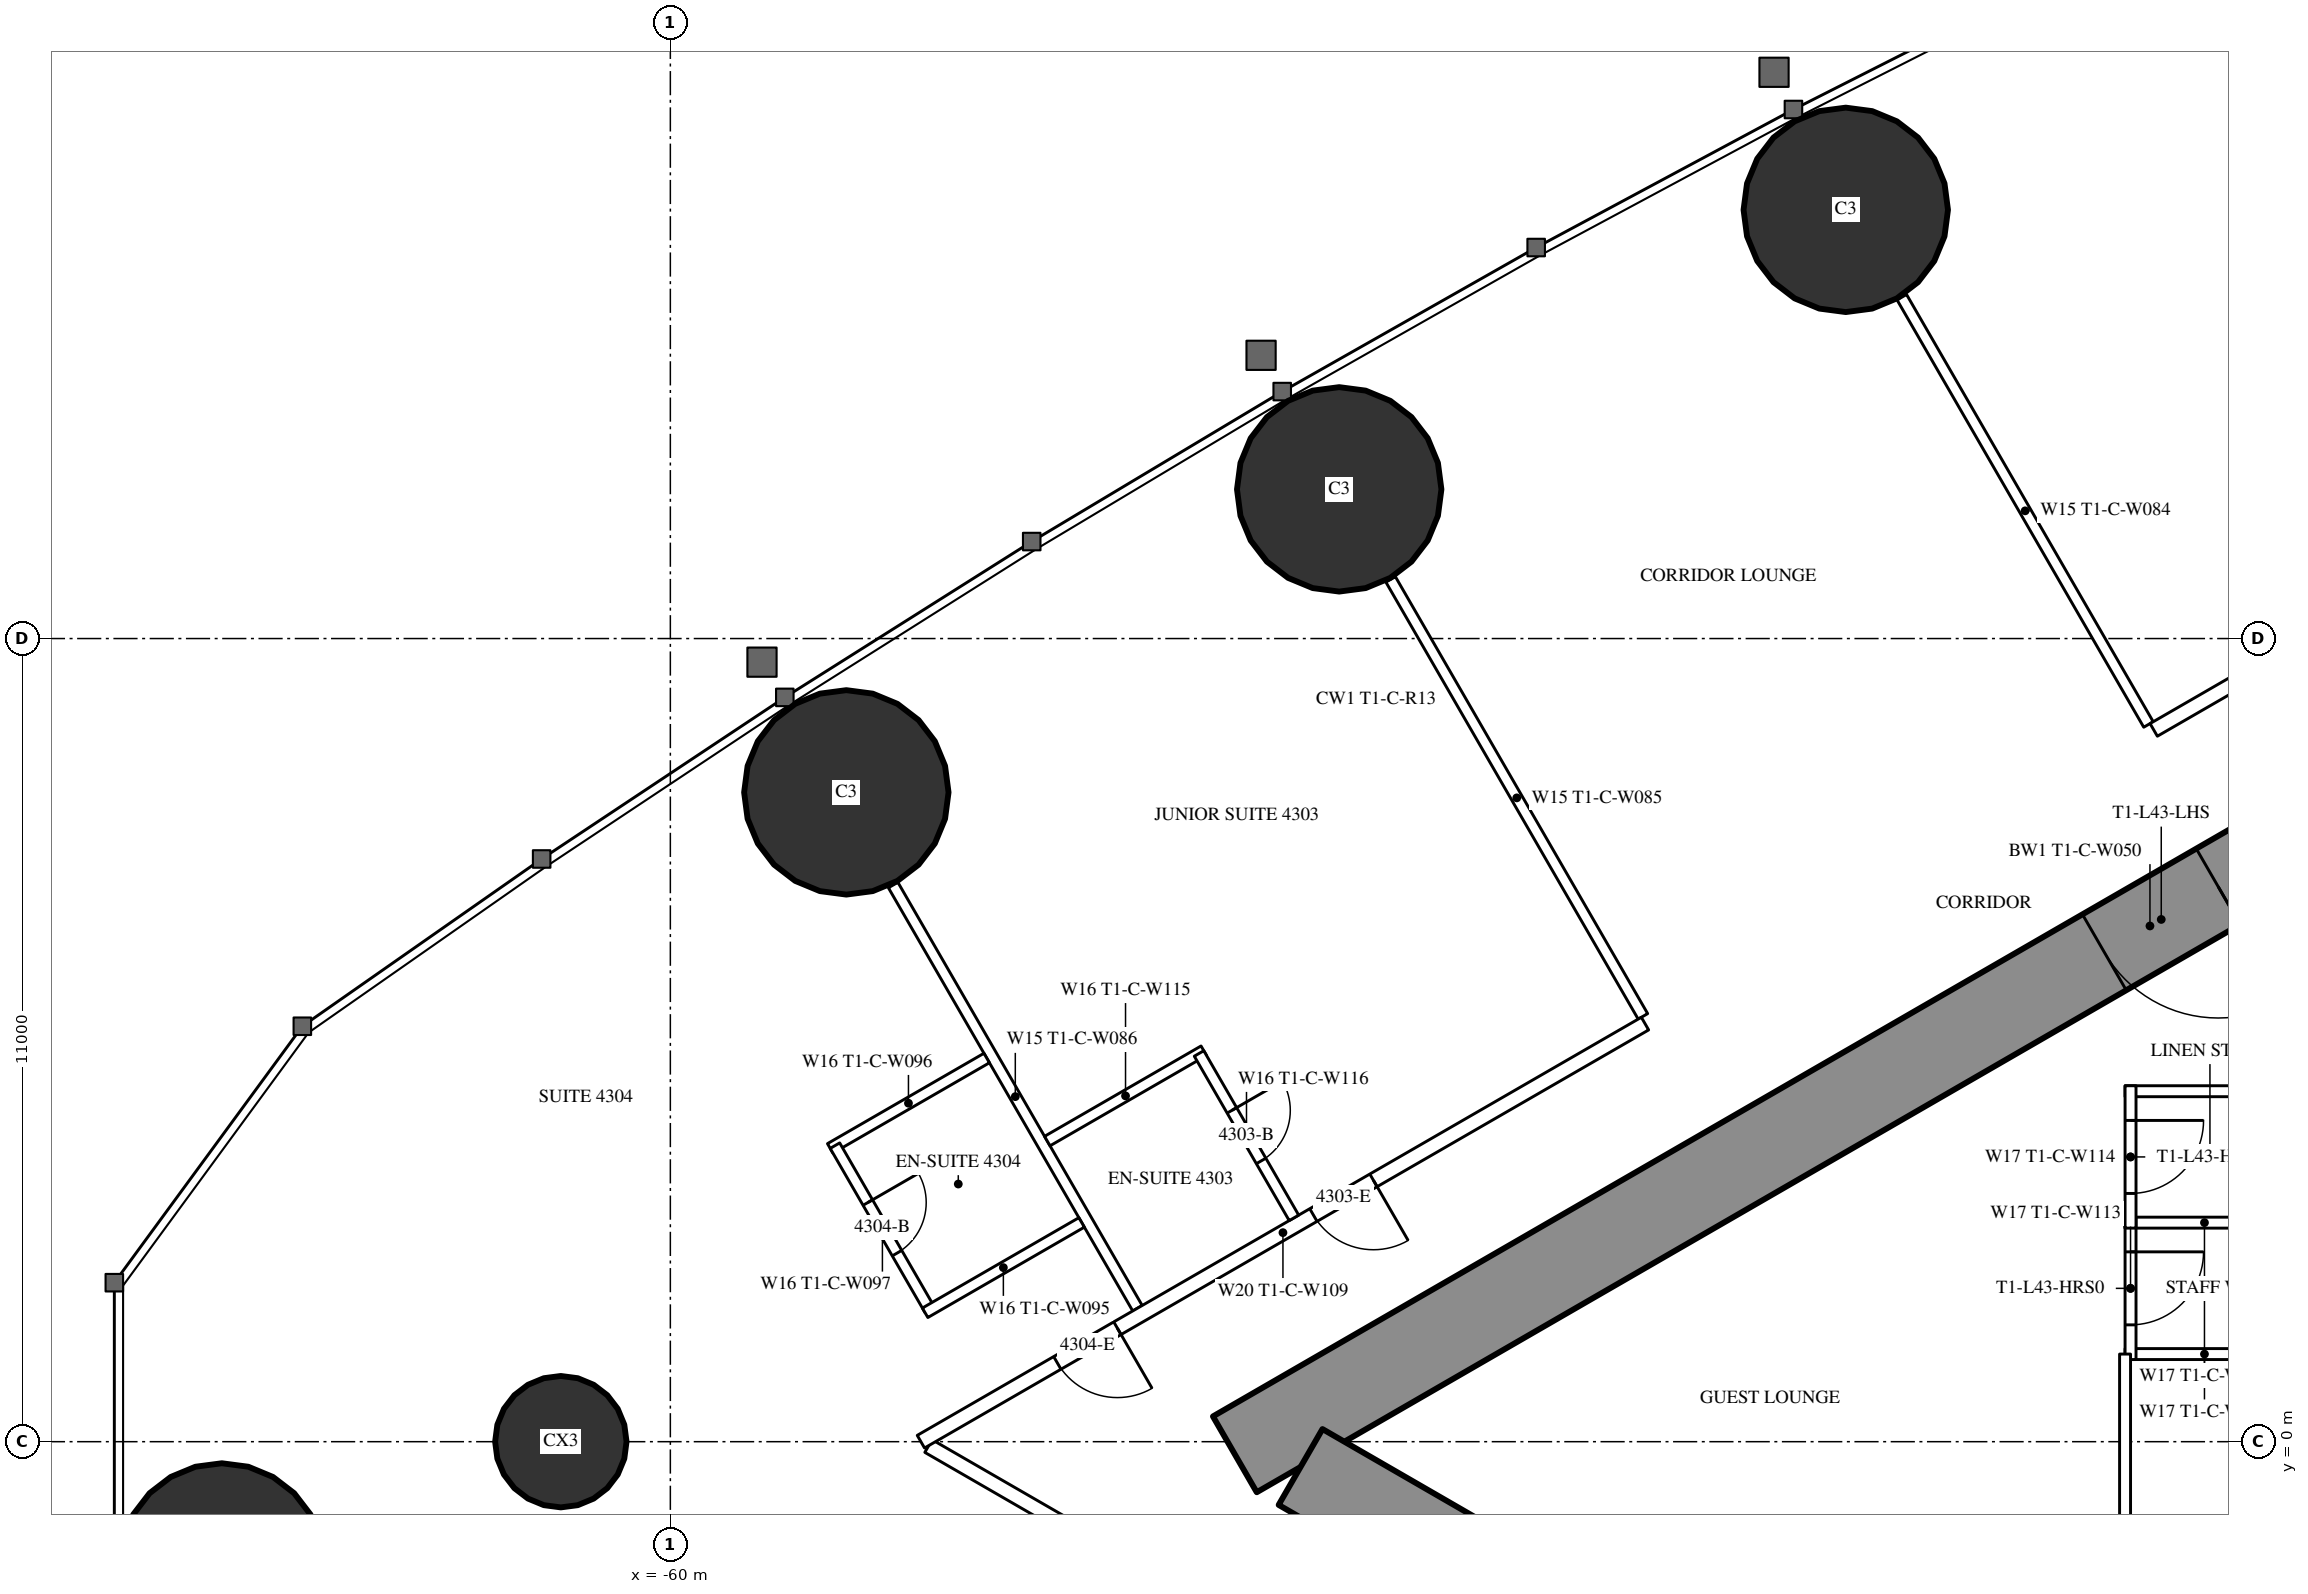
"""IFC4 building model, lengths in metres.
Left out: names, types, materials, properties, quantities, classifications, styles, units other than length and angle.
Written with IfcOpenShell. Run it as: python <this file> out.ifc"""

import sys

from ifc_helpers import new_model, si_unit, direction, frame, frame_2d, origin, origin_2d, place, context, subcontext, project, spatial, rectangle, circle, extrude, element, fill, save


model = new_model("IFC4")
c1 = context("Model", 3, precision=1e-05, world=origin(), true_north=direction((0.0, 1.0)))
c2 = subcontext(c1, "Body", "Model", "MODEL_VIEW")
j1 = project(units=[si_unit("LENGTHUNIT", "METRE"), si_unit("PLANEANGLEUNIT", "RADIAN")], contexts=[c1])
p1 = place(None, origin())
s1 = spatial("IfcSite", under=j1, at=p1, CompositionType="ELEMENT")
p2 = place(p1, origin())
s2 = spatial("IfcBuilding", under=s1, at=p2, CompositionType="ELEMENT")
p3 = place(p2, frame((0.0, 0.0, 163.3)))
s3 = spatial("IfcBuildingStorey", under=s2, at=p3, CompositionType="ELEMENT", Elevation=163.3)
for number, where, z_axis, x_axis in (
    (1, (-66.143, -1.695, 0.0), (0.0, 0.0, 1.0), (1.0, 0.0, 0.0)),
    (2, (-43.9, 16.871, 0.0), (0.0, 0.0, 1.0), (1.0, 0.0, 0.0)),
    (3, (-50.839, 13.043, 0.0), (0.0, 0.0, 1.0), (1.0, 0.0, 0.0)),
    (4, (-57.59, 8.893, 0.0), (0.0, 0.0, 1.0), (1.0, 0.0, 0.0)),
):
    element("IfcColumn", number, at=place(p3, frame(where, z_axis=z_axis, x_axis=x_axis)), inside=s3, PredefinedType="COLUMN", context=c2, shape_type="SweptSolid", body=[
        extrude(circle(Radius=1.4, at=origin_2d()), origin(), (0.0, 0.0, 1.0), 3.5),
    ])
p4 = place(p3, frame((-61.5, 0.0, 0.0), z_axis=(0.0, 0.0, 1.0), x_axis=(1.0, 0.0, 0.0)))
e5 = element("IfcColumn", 5, at=p4, inside=s3, PredefinedType="COLUMN", context=c2, shape_type="SweptSolid", body=[
    extrude(circle(Radius=0.9, at=origin_2d()), origin(), (0.0, 0.0, 1.0), 3.5),
])
p5 = place(p3, frame((-27.2, 14.3, 0.0), z_axis=(0.0, 0.0, 1.0), x_axis=(-0.866026593062, -0.499997940104, 0.0)))
e6 = element("IfcWall", 6, at=p5, inside=s3, PredefinedType="SHEAR", context=c2, shape_type="SweptSolid", body=[
    extrude(rectangle(XDim=28.946, YDim=1.2, at=frame_2d((14.473, 0.0))), origin(), (0.0, 0.0, 1.0), 3.5),
])
p6 = place(p5, frame((4.6, 0.0, 0.0)))
e7 = element("IfcOpeningElement", 7, at=p6, cuts=e6, PredefinedType="OPENING", context=c2, shape_type="SweptSolid", body=[
    extrude(rectangle(XDim=1.0, YDim=2.2, at=frame_2d((0.5, 1.1))), frame((0.0, 0.61, 0.0), z_axis=(0.0, -1.0, 0.0), x_axis=(1.0, 0.0, 0.0)), (0.0, 0.0, 1.0), 1.22),
])
p7 = place(p5, frame((13.395, 0.0, 0.0)))
e8 = element("IfcOpeningElement", 8, at=p7, cuts=e6, PredefinedType="OPENING", context=c2, shape_type="SweptSolid", body=[
    extrude(rectangle(XDim=1.8, YDim=2.2, at=frame_2d((0.9, 1.1))), frame((0.0, 0.61, 0.0), z_axis=(0.0, -1.0, 0.0), x_axis=(1.0, 0.0, 0.0)), (0.0, 0.0, 1.0), 1.22),
])
p8 = place(p3, frame((-27.2, -14.3, 0.0), z_axis=(0.0, 0.0, 1.0), x_axis=(-0.866024021859, 0.500002393557, 0.0)))
e9 = element("IfcWall", 9, at=p8, inside=s3, PredefinedType="SHEAR", context=c2, shape_type="SweptSolid", body=[
    extrude(rectangle(XDim=27.907, YDim=1.2, at=frame_2d((13.954, 0.0))), origin(), (0.0, 0.0, 1.0), 3.5),
])
p9 = place(p8, frame((4.6, 0.0, 0.0)))
e10 = element("IfcOpeningElement", 10, at=p9, cuts=e9, PredefinedType="OPENING", context=c2, shape_type="SweptSolid", body=[
    extrude(rectangle(XDim=1.0, YDim=2.2, at=frame_2d((0.5, 1.1))), frame((0.0, 0.61, 0.0), z_axis=(0.0, -1.0, 0.0), x_axis=(1.0, 0.0, 0.0)), (0.0, 0.0, 1.0), 1.22),
])
p10 = place(p8, frame((13.395, 0.0, 0.0)))
e11 = element("IfcOpeningElement", 11, at=p10, cuts=e9, PredefinedType="OPENING", context=c2, shape_type="SweptSolid", body=[
    extrude(rectangle(XDim=1.8, YDim=2.2, at=frame_2d((0.9, 1.1))), frame((0.0, 0.61, 0.0), z_axis=(0.0, -1.0, 0.0), x_axis=(1.0, 0.0, 0.0)), (0.0, 0.0, 1.0), 1.22),
])
p11 = place(p3, frame((-39.754, 9.823, 0.0), z_axis=(0.0, 0.0, 1.0), x_axis=(-0.499997670926, 0.866026748472, 0.0)))
e12 = element("IfcWall", 12, at=p11, inside=s3, PredefinedType="PARTITIONING", context=c2, shape_type="SweptSolid", body=[
    extrude(rectangle(XDim=6.757, YDim=0.15, at=frame_2d((3.379, 0.0))), origin(), (0.0, 0.0, 1.0), 2.3),
])
p12 = place(p3, frame((-46.679, 5.825, 0.0), z_axis=(0.0, 0.0, 1.0), x_axis=(-0.500006839597, 0.866021454905, 0.0)))
e13 = element("IfcWall", 13, at=p12, inside=s3, PredefinedType="PARTITIONING", context=c2, shape_type="SweptSolid", body=[
    extrude(rectangle(XDim=6.911, YDim=0.15, at=frame_2d((3.456, 0.0))), origin(), (0.0, 0.0, 1.0), 2.3),
])
p13 = place(p3, frame((-53.602, 1.828, 0.0), z_axis=(0.0, 0.0, 1.0), x_axis=(-0.49999191814, 0.866030069798, 0.0)))
e14 = element("IfcWall", 14, at=p13, inside=s3, PredefinedType="PARTITIONING", context=c2, shape_type="SweptSolid", body=[
    extrude(rectangle(XDim=6.692, YDim=0.15, at=frame_2d((3.346, 0.0))), origin(), (0.0, 0.0, 1.0), 2.3),
])
p14 = place(p3, frame((-44.715, -6.844, 0.0), z_axis=(0.0, 0.0, 1.0), x_axis=(-0.866025261224, 0.500000246922, 0.0)))
e15 = element("IfcWall", 15, at=p14, inside=s3, PredefinedType="PARTITIONING", context=c2, shape_type="SweptSolid", body=[
    extrude(rectangle(XDim=13.567, YDim=0.2, at=frame_2d((6.783, 0.0))), origin(), (0.0, 0.0, 1.0), 3.25),
])
p15 = place(p14, frame((10.579, 0.0, 0.0)))
e16 = element("IfcOpeningElement", 16, at=p15, cuts=e15, PredefinedType="OPENING", context=c2, shape_type="SweptSolid", body=[
    extrude(rectangle(XDim=0.95, YDim=2.2, at=frame_2d((0.475, 1.1))), frame((0.0, 0.11, 0.0), z_axis=(0.0, -1.0, 0.0), x_axis=(1.0, 0.0, 0.0)), (0.0, 0.0, 1.0), 0.22),
])
p16 = place(p14, frame((8.879, 0.0, 0.0)))
e17 = element("IfcOpeningElement", 17, at=p16, cuts=e15, PredefinedType="OPENING", context=c2, shape_type="SweptSolid", body=[
    extrude(rectangle(XDim=0.95, YDim=2.2, at=frame_2d((0.475, 1.1))), frame((0.0, 0.11, 0.0), z_axis=(0.0, -1.0, 0.0), x_axis=(1.0, 0.0, 0.0)), (0.0, 0.0, 1.0), 0.22),
])
p17 = place(p14, frame((0.5, 0.0, 0.0)))
e18 = element("IfcOpeningElement", 18, at=p17, cuts=e15, PredefinedType="OPENING", context=c2, shape_type="SweptSolid", body=[
    extrude(rectangle(XDim=1.435, YDim=2.2, at=frame_2d((0.718, 1.1))), frame((0.0, 0.11, 0.0), z_axis=(0.0, -1.0, 0.0), x_axis=(1.0, 0.0, 0.0)), (0.0, 0.0, 1.0), 0.22),
])
p18 = place(p3, frame((-27.86, 16.575, 0.0), z_axis=(0.0, 0.0, 1.0), x_axis=(-0.866026850238, -0.499997494661, 0.0)))
e19 = element("IfcWall", 19, at=p18, inside=s3, PredefinedType="PARTITIONING", context=c2, shape_type="SweptSolid", body=[
    extrude(rectangle(XDim=13.651, YDim=0.2, at=frame_2d((6.826, 0.0))), origin(), (0.0, 0.0, 1.0), 3.25),
])
p19 = place(p18, frame((3.75, 0.0, 0.0)))
e20 = element("IfcOpeningElement", 20, at=p19, cuts=e19, PredefinedType="OPENING", context=c2, shape_type="SweptSolid", body=[
    extrude(rectangle(XDim=1.0, YDim=2.2, at=frame_2d((0.5, 1.1))), frame((0.0, 0.11, 0.0), z_axis=(0.0, -1.0, 0.0), x_axis=(1.0, 0.0, 0.0)), (0.0, 0.0, 1.0), 0.22),
])
p20 = place(p3, frame((-46.65, 5.726, 0.0), z_axis=(0.0, 0.0, 1.0), x_axis=(-0.866027963864, -0.499995565786, 0.0)))
e21 = element("IfcWall", 21, at=p20, inside=s3, PredefinedType="PARTITIONING", context=c2, shape_type="SweptSolid", body=[
    extrude(rectangle(XDim=11.452, YDim=0.2, at=frame_2d((5.726, 0.0))), origin(), (0.0, 0.0, 1.0), 3.25),
])
p21 = place(p20, frame((4.294, 0.0, 0.0)))
e22 = element("IfcOpeningElement", 22, at=p21, cuts=e21, PredefinedType="OPENING", context=c2, shape_type="SweptSolid", body=[
    extrude(rectangle(XDim=0.95, YDim=2.2, at=frame_2d((0.475, 1.1))), frame((0.0, 0.11, 0.0), z_axis=(0.0, -1.0, 0.0), x_axis=(1.0, 0.0, 0.0)), (0.0, 0.0, 1.0), 0.22),
])
p22 = place(p20, frame((8.344, 0.0, 0.0)))
e23 = element("IfcOpeningElement", 23, at=p22, cuts=e21, PredefinedType="OPENING", context=c2, shape_type="SweptSolid", body=[
    extrude(rectangle(XDim=0.95, YDim=2.2, at=frame_2d((0.475, 1.1))), frame((0.0, 0.11, 0.0), z_axis=(0.0, -1.0, 0.0), x_axis=(1.0, 0.0, 0.0)), (0.0, 0.0, 1.0), 0.22),
])
p23 = place(p3, frame((-52.694, 5.355, 0.0), z_axis=(0.0, 0.0, 1.0), x_axis=(-0.866031185235, -0.4999899861, 0.0)))
e24 = element("IfcWall", 24, at=p23, inside=s3, PredefinedType="PARTITIONING", context=c2, shape_type="SweptSolid", body=[
    extrude(rectangle(XDim=2.475, YDim=0.15, at=frame_2d((1.238, 0.0))), origin(), (0.0, 0.0, 1.0), 3.25),
])
p24 = place(p3, frame((-51.459, 3.065, 0.0), z_axis=(0.0, 0.0, 1.0), x_axis=(-0.499936506574, 0.866062058628, 0.0)))
e25 = element("IfcWall", 25, at=p24, inside=s3, PredefinedType="PARTITIONING", context=c2, shape_type="SweptSolid", body=[
    extrude(rectangle(XDim=2.6, YDim=0.15, at=frame_2d((1.3, 0.0))), origin(), (0.0, 0.0, 1.0), 3.25),
])
p25 = place(p24, frame((0.9, 0.0, 0.0)))
e26 = element("IfcOpeningElement", 26, at=p25, cuts=e25, PredefinedType="OPENING", context=c2, shape_type="SweptSolid", body=[
    extrude(rectangle(XDim=0.8, YDim=2.2, at=frame_2d((0.4, 1.1))), frame((0.0, 0.085, 0.0), z_axis=(0.0, -1.0, 0.0), x_axis=(1.0, 0.0, 0.0)), (0.0, 0.0, 1.0), 0.17),
])
p26 = place(p3, frame((-55.667, 5.255, 0.0), z_axis=(0.0, 0.0, 1.0), x_axis=(-0.866006523861, -0.500032699561, 0.0)))
e27 = element("IfcWall", 27, at=p26, inside=s3, PredefinedType="PARTITIONING", context=c2, shape_type="SweptSolid", body=[
    extrude(rectangle(XDim=2.475, YDim=0.15, at=frame_2d((1.237, 0.0))), origin(), (0.0, 0.0, 1.0), 3.25),
])
p27 = place(p3, frame((-56.446, 1.803, 0.0), z_axis=(0.0, 0.0, 1.0), x_axis=(-0.499936506574, 0.866062058628, 0.0)))
e28 = element("IfcWall", 28, at=p27, inside=s3, PredefinedType="PARTITIONING", context=c2, shape_type="SweptSolid", body=[
    extrude(rectangle(XDim=2.6, YDim=0.15, at=frame_2d((1.3, 0.0))), origin(), (0.0, 0.0, 1.0), 3.25),
])
p28 = place(p27, frame((0.9, 0.0, 0.0)))
e29 = element("IfcOpeningElement", 29, at=p28, cuts=e28, PredefinedType="OPENING", context=c2, shape_type="SweptSolid", body=[
    extrude(rectangle(XDim=0.8, YDim=2.2, at=frame_2d((0.4, 1.1))), frame((0.0, 0.085, 0.0), z_axis=(0.0, -1.0, 0.0), x_axis=(1.0, 0.0, 0.0)), (0.0, 0.0, 1.0), 0.17),
])
p29 = place(p3, frame((-54.367, 3.003, 0.0), z_axis=(0.0, 0.0, 1.0), x_axis=(-0.866031185235, -0.4999899861, 0.0)))
e30 = element("IfcWall", 30, at=p29, inside=s3, PredefinedType="PARTITIONING", context=c2, shape_type="SweptSolid", body=[
    extrude(rectangle(XDim=2.475, YDim=0.15, at=frame_2d((1.238, 0.0))), origin(), (0.0, 0.0, 1.0), 3.25),
])
for number, where, z_axis, x_axis in (
    (31, (-37.9, 1.2, 0.0), (0.0, 0.0, 1.0), (-1.0, 0.0, 0.0)),
    (32, (-37.9, 3.0, 0.0), (0.0, 0.0, 1.0), (-1.0, 0.0, 0.0)),
    (33, (-37.9, 4.8, 0.0), (0.0, 0.0, 1.0), (-1.0, 0.0, 0.0)),
):
    element("IfcWall", number, at=place(p3, frame(where, z_axis=z_axis, x_axis=x_axis)), inside=s3, PredefinedType="PARTITIONING", context=c2, shape_type="SweptSolid", body=[
        extrude(rectangle(XDim=2.175, YDim=0.15, at=frame_2d((1.087, 0.0))), origin(), (0.0, 0.0, 1.0), 3.25),
    ])
p30 = place(p3, frame((-40.0, 3.075, 0.0), z_axis=(0.0, 0.0, 1.0), x_axis=(0.0, -1.0, 0.0)))
e34 = element("IfcWall", 34, at=p30, inside=s3, PredefinedType="PARTITIONING", context=c2, shape_type="SweptSolid", body=[
    extrude(rectangle(XDim=1.95, YDim=0.15, at=frame_2d((0.975, 0.0))), origin(), (0.0, 0.0, 1.0), 3.25),
])
p31 = place(p30, frame((0.475, 0.0, 0.0)))
e35 = element("IfcOpeningElement", 35, at=p31, cuts=e34, PredefinedType="OPENING", context=c2, shape_type="SweptSolid", body=[
    extrude(rectangle(XDim=1.0, YDim=2.2, at=frame_2d((0.5, 1.1))), frame((0.0, 0.085, 0.0), z_axis=(0.0, -1.0, 0.0), x_axis=(1.0, 0.0, 0.0)), (0.0, 0.0, 1.0), 0.17),
])
p32 = place(p3, frame((-40.0, 4.875, 0.0), z_axis=(0.0, 0.0, 1.0), x_axis=(0.0, -1.0, 0.0)))
e36 = element("IfcWall", 36, at=p32, inside=s3, PredefinedType="PARTITIONING", context=c2, shape_type="SweptSolid", body=[
    extrude(rectangle(XDim=1.95, YDim=0.15, at=frame_2d((0.975, 0.0))), origin(), (0.0, 0.0, 1.0), 3.25),
])
p33 = place(p32, frame((0.475, 0.0, 0.0)))
e37 = element("IfcOpeningElement", 37, at=p33, cuts=e36, PredefinedType="OPENING", context=c2, shape_type="SweptSolid", body=[
    extrude(rectangle(XDim=1.0, YDim=2.2, at=frame_2d((0.5, 1.1))), frame((0.0, 0.085, 0.0), z_axis=(0.0, -1.0, 0.0), x_axis=(1.0, 0.0, 0.0)), (0.0, 0.0, 1.0), 0.17),
])
p34 = place(p3, frame((-40.075, 1.2, 0.0), z_axis=(0.0, 0.0, 1.0), x_axis=(0.0, -1.0, 0.0)))
e38 = element("IfcWall", 38, at=p34, inside=s3, PredefinedType="PARTITIONING", context=c2, shape_type="SweptSolid", body=[
    extrude(rectangle(XDim=7.374, YDim=0.15, at=frame_2d((3.687, 0.0))), origin(), (0.0, 0.0, 1.0), 3.25),
])
p35 = place(p34, frame((2.787, 0.0, 0.0)))
e39 = element("IfcOpeningElement", 39, at=p35, cuts=e38, PredefinedType="OPENING", context=c2, shape_type="SweptSolid", body=[
    extrude(rectangle(XDim=1.8, YDim=2.2, at=frame_2d((0.9, 1.1))), frame((0.0, 0.085, 0.0), z_axis=(0.0, -1.0, 0.0), x_axis=(1.0, 0.0, 0.0)), (0.0, 0.0, 1.0), 0.17),
])
p36 = place(p25, origin())
e40 = element("IfcDoor", 40, at=p36, inside=s3, OperationType="SINGLE_SWING_RIGHT", PredefinedType="DOOR", context=c2, shape_type="SweptSolid", body=[
    extrude(rectangle(XDim=0.8, YDim=2.2, at=frame_2d((0.4, 1.1))), frame((0.0, 0.025, 0.0), z_axis=(0.0, -1.0, 0.0), x_axis=(1.0, 0.0, 0.0)), (0.0, 0.0, 1.0), 0.05),
])
fill(e26, e40)
p37 = place(p21, origin())
e41 = element("IfcDoor", 41, at=p37, inside=s3, OperationType="SINGLE_SWING_LEFT", PredefinedType="DOOR", context=c2, shape_type="SweptSolid", body=[
    extrude(rectangle(XDim=0.95, YDim=2.2, at=frame_2d((0.475, 1.1))), frame((0.0, 0.025, 0.0), z_axis=(0.0, -1.0, 0.0), x_axis=(1.0, 0.0, 0.0)), (0.0, 0.0, 1.0), 0.05),
])
fill(e22, e41)
p38 = place(p28, origin())
e42 = element("IfcDoor", 42, at=p38, inside=s3, OperationType="SINGLE_SWING_RIGHT", PredefinedType="DOOR", context=c2, shape_type="SweptSolid", body=[
    extrude(rectangle(XDim=0.8, YDim=2.2, at=frame_2d((0.4, 1.1))), frame((0.0, 0.025, 0.0), z_axis=(0.0, -1.0, 0.0), x_axis=(1.0, 0.0, 0.0)), (0.0, 0.0, 1.0), 0.05),
])
fill(e29, e42)
p39 = place(p22, origin())
e43 = element("IfcDoor", 43, at=p39, inside=s3, OperationType="SINGLE_SWING_LEFT", PredefinedType="DOOR", context=c2, shape_type="SweptSolid", body=[
    extrude(rectangle(XDim=0.95, YDim=2.2, at=frame_2d((0.475, 1.1))), frame((0.0, 0.025, 0.0), z_axis=(0.0, -1.0, 0.0), x_axis=(1.0, 0.0, 0.0)), (0.0, 0.0, 1.0), 0.05),
])
fill(e23, e43)
p40 = place(p31, origin())
e44 = element("IfcDoor", 44, at=p40, inside=s3, OperationType="SINGLE_SWING_LEFT", PredefinedType="DOOR", context=c2, shape_type="SweptSolid", body=[
    extrude(rectangle(XDim=1.0, YDim=2.2, at=frame_2d((0.5, 1.1))), frame((0.0, 0.025, 0.0), z_axis=(0.0, -1.0, 0.0), x_axis=(1.0, 0.0, 0.0)), (0.0, 0.0, 1.0), 0.05),
])
fill(e35, e44)
p41 = place(p33, origin())
e45 = element("IfcDoor", 45, at=p41, inside=s3, OperationType="SINGLE_SWING_LEFT", PredefinedType="DOOR", context=c2, shape_type="SweptSolid", body=[
    extrude(rectangle(XDim=1.0, YDim=2.2, at=frame_2d((0.5, 1.1))), frame((0.0, 0.025, 0.0), z_axis=(0.0, -1.0, 0.0), x_axis=(1.0, 0.0, 0.0)), (0.0, 0.0, 1.0), 0.05),
])
fill(e37, e45)
p42 = place(p7, origin())
e46 = element("IfcDoor", 46, at=p42, inside=s3, OperationType="DOUBLE_DOOR_SINGLE_SWING", PredefinedType="DOOR", context=c2, shape_type="SweptSolid", body=[
    extrude(rectangle(XDim=1.8, YDim=2.2, at=frame_2d((0.9, 1.1))), frame((0.0, 0.025, 0.0), z_axis=(0.0, -1.0, 0.0), x_axis=(1.0, 0.0, 0.0)), (0.0, 0.0, 1.0), 0.05),
])
fill(e8, e46)
save(model, sys.argv[1])
